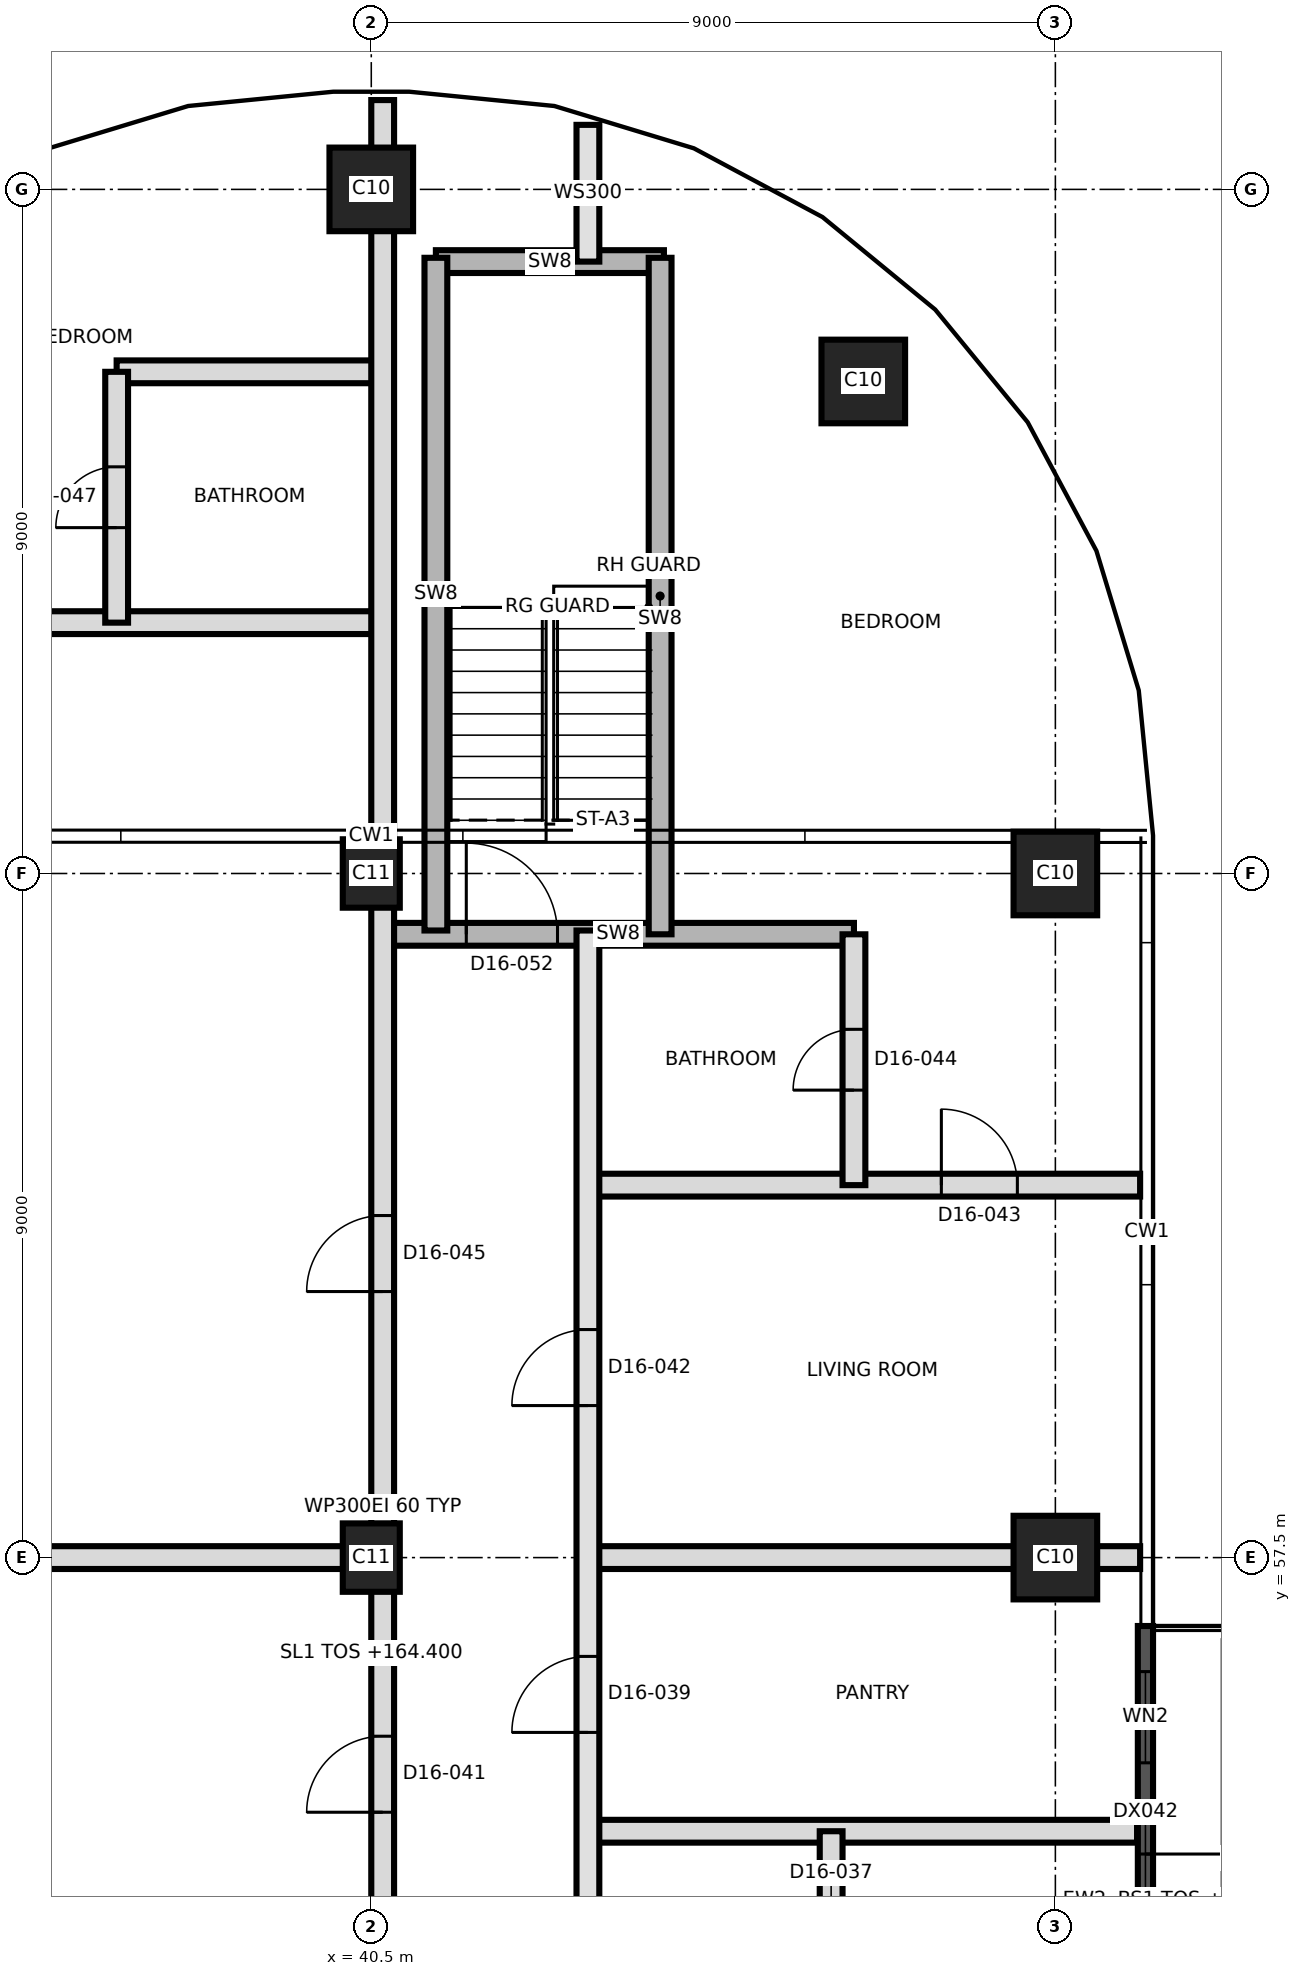
"""IFC4 building model, lengths in metres.
Left out: names, types, materials, properties, quantities, classifications, styles, units other than length and angle.
Written with IfcOpenShell. Run it as: python <this file> out.ifc"""

import sys

from ifc_helpers import new_model, si_unit, direction, frame, frame_2d, origin, origin_2d, place, context, subcontext, project, spatial, rectangle, extrude, element, fill, save


model = new_model("IFC4")
c1 = context("Model", 3, precision=1e-05, world=origin(), true_north=direction((0.0, 1.0)))
c2 = subcontext(c1, "Body", "Model", "MODEL_VIEW")
j1 = project(units=[si_unit("LENGTHUNIT", "METRE"), si_unit("PLANEANGLEUNIT", "RADIAN")], contexts=[c1])
p1 = place(None, origin())
s1 = spatial("IfcSite", under=j1, at=p1, CompositionType="ELEMENT")
p2 = place(p1, origin())
s2 = spatial("IfcBuilding", under=s1, at=p2, CompositionType="ELEMENT")
p3 = place(p2, frame((0.0, 0.0, 164.4)))
s3 = spatial("IfcBuildingStorey", under=s2, at=p3, CompositionType="ELEMENT", Elevation=164.4)
p4 = place(p3, frame((40.5, 57.5, 0.0), z_axis=(0.0, 0.0, 1.0), x_axis=(0.0, 1.0, 0.0)))
e1 = element("IfcColumn", 1, at=p4, inside=s3, PredefinedType="COLUMN", context=c2, shape_type="SweptSolid", body=[
    extrude(rectangle(XDim=0.9, YDim=0.75, at=origin_2d()), origin(), (0.0, 0.0, 1.0), 3.7),
])
p5 = place(p3, frame((49.5, 57.5, 0.0), z_axis=(0.0, 0.0, 1.0), x_axis=(1.0, 0.0, 0.0)))
e2 = element("IfcColumn", 2, at=p5, inside=s3, PredefinedType="COLUMN", context=c2, shape_type="SweptSolid", body=[
    extrude(rectangle(XDim=1.1, YDim=1.1, at=origin_2d()), origin(), (0.0, 0.0, 1.0), 3.7),
])
p6 = place(p3, frame((40.5, 66.5, 0.0), z_axis=(0.0, 0.0, 1.0), x_axis=(0.0, 1.0, 0.0)))
e3 = element("IfcColumn", 3, at=p6, inside=s3, PredefinedType="COLUMN", context=c2, shape_type="SweptSolid", body=[
    extrude(rectangle(XDim=0.9, YDim=0.75, at=origin_2d()), origin(), (0.0, 0.0, 1.0), 3.7),
])
for number, where, z_axis, x_axis in (
    (4, (49.5, 66.5, 0.0), (0.0, 0.0, 1.0), (1.0, 0.0, 0.0)),
    (5, (46.973, 72.973, 0.0), (0.0, 0.0, 1.0), (1.0, 0.0, 0.0)),
    (6, (40.5, 75.5, 0.0), (0.0, 0.0, 1.0), (1.0, 0.0, 0.0)),
):
    element("IfcColumn", number, at=place(p3, frame(where, z_axis=z_axis, x_axis=x_axis)), inside=s3, PredefinedType="COLUMN", context=c2, shape_type="SweptSolid", body=[
        extrude(rectangle(XDim=1.1, YDim=1.1, at=origin_2d()), origin(), (0.0, 0.0, 1.0), 3.7),
    ])
p7 = place(p3, frame((50.685, 56.6, 0.0), z_axis=(0.0, 0.0, 1.0), x_axis=(0.0, -1.0, 0.0)))
e7 = element("IfcWall", 7, at=p7, inside=s3, PredefinedType="SOLIDWALL", context=c2, shape_type="SweptSolid", body=[
    extrude(rectangle(XDim=7.2, YDim=0.2, at=frame_2d((3.6, 0.0))), origin(), (0.0, 0.0, 1.0), 3.4),
])
p8 = place(p7, frame((3.0, 0.0, 0.0)))
e8 = element("IfcOpeningElement", 8, at=p8, cuts=e7, PredefinedType="OPENING", context=c2, shape_type="SweptSolid", body=[
    extrude(rectangle(XDim=1.8, YDim=2.4, at=frame_2d((0.9, 1.2))), frame((0.0, 0.11, 0.0), z_axis=(0.0, -1.0, 0.0), x_axis=(1.0, 0.0, 0.0)), (0.0, 0.0, 1.0), 0.22),
])
p9 = place(p7, frame((5.4, 0.0, 0.9)))
e9 = element("IfcOpeningElement", 9, at=p9, cuts=e7, PredefinedType="OPENING", context=c2, shape_type="SweptSolid", body=[
    extrude(rectangle(XDim=1.2, YDim=2.1, at=frame_2d((0.6, 1.05))), frame((0.0, 0.11, 0.0), z_axis=(0.0, -1.0, 0.0), x_axis=(1.0, 0.0, 0.0)), (0.0, 0.0, 1.0), 0.22),
])
p10 = place(p7, frame((0.6, 0.0, 0.9)))
e10 = element("IfcOpeningElement", 10, at=p10, cuts=e7, PredefinedType="OPENING", context=c2, shape_type="SweptSolid", body=[
    extrude(rectangle(XDim=1.2, YDim=2.1, at=frame_2d((0.6, 1.05))), frame((0.0, 0.11, 0.0), z_axis=(0.0, -1.0, 0.0), x_axis=(1.0, 0.0, 0.0)), (0.0, 0.0, 1.0), 0.22),
])
p11 = place(p3, frame((43.35, 53.9, 0.0), z_axis=(0.0, 0.0, 1.0), x_axis=(1.0, 0.0, 0.0)))
e11 = element("IfcWall", 11, at=p11, inside=s3, PredefinedType="PARTITIONING", context=c2, shape_type="SweptSolid", body=[
    extrude(rectangle(XDim=7.225, YDim=0.3, at=frame_2d((3.612, 0.0))), origin(), (0.0, 0.0, 1.0), 3.4),
])
p12 = place(p3, frame((30.565, 57.5, 0.0), z_axis=(0.0, 0.0, 1.0), x_axis=(1.0, 0.0, 0.0)))
e12 = element("IfcWall", 12, at=p12, inside=s3, PredefinedType="PARTITIONING", context=c2, shape_type="SweptSolid", body=[
    extrude(rectangle(XDim=10.085, YDim=0.3, at=frame_2d((5.042, 0.0))), origin(), (0.0, 0.0, 1.0), 3.4),
])
p13 = place(p3, frame((43.35, 57.5, 0.0), z_axis=(0.0, 0.0, 1.0), x_axis=(1.0, 0.0, 0.0)))
e13 = element("IfcWall", 13, at=p13, inside=s3, PredefinedType="PARTITIONING", context=c2, shape_type="SweptSolid", body=[
    extrude(rectangle(XDim=7.265, YDim=0.3, at=frame_2d((3.632, 0.0))), origin(), (0.0, 0.0, 1.0), 3.4),
])
p14 = place(p3, frame((43.35, 62.4, 0.0), z_axis=(0.0, 0.0, 1.0), x_axis=(1.0, 0.0, 0.0)))
e14 = element("IfcWall", 14, at=p14, inside=s3, PredefinedType="PARTITIONING", context=c2, shape_type="SweptSolid", body=[
    extrude(rectangle(XDim=7.265, YDim=0.3, at=frame_2d((3.632, 0.0))), origin(), (0.0, 0.0, 1.0), 3.4),
])
p15 = place(p14, frame((4.65, 0.0, 0.0)))
e15 = element("IfcOpeningElement", 15, at=p15, cuts=e14, PredefinedType="OPENING", context=c2, shape_type="SweptSolid", body=[
    extrude(rectangle(XDim=1.0, YDim=2.1, at=frame_2d((0.5, 1.05))), frame((0.0, 0.16, 0.0), z_axis=(0.0, -1.0, 0.0), x_axis=(1.0, 0.0, 0.0)), (0.0, 0.0, 1.0), 0.32),
])
p16 = place(p3, frame((40.65, 65.7, 0.0), z_axis=(0.0, 0.0, 1.0), x_axis=(1.0, 0.0, 0.0)))
e16 = element("IfcWall", 16, at=p16, inside=s3, PredefinedType="SHEAR", context=c2, shape_type="SweptSolid", body=[
    extrude(rectangle(XDim=6.2, YDim=0.3, at=frame_2d((3.1, 0.0))), origin(), (0.0, 0.0, 1.0), 3.4),
])
p17 = place(p16, frame((1.1, 0.0, 0.0)))
e17 = element("IfcOpeningElement", 17, at=p17, cuts=e16, PredefinedType="OPENING", context=c2, shape_type="SweptSolid", body=[
    extrude(rectangle(XDim=1.2, YDim=2.1, at=frame_2d((0.6, 1.05))), frame((0.0, 0.16, 0.0), z_axis=(0.0, -1.0, 0.0), x_axis=(1.0, 0.0, 0.0)), (0.0, 0.0, 1.0), 0.32),
])
p18 = place(p3, frame((30.788, 69.8, 0.0), z_axis=(0.0, 0.0, 1.0), x_axis=(1.0, 0.0, 0.0)))
e18 = element("IfcWall", 18, at=p18, inside=s3, PredefinedType="PARTITIONING", context=c2, shape_type="SweptSolid", body=[
    extrude(rectangle(XDim=9.862, YDim=0.3, at=frame_2d((4.931, 0.0))), origin(), (0.0, 0.0, 1.0), 3.4),
])
p19 = place(p18, frame((4.212, 0.0, 0.0)))
e19 = element("IfcOpeningElement", 19, at=p19, cuts=e18, PredefinedType="OPENING", context=c2, shape_type="SweptSolid", body=[
    extrude(rectangle(XDim=1.0, YDim=2.1, at=frame_2d((0.5, 1.05))), frame((0.0, 0.16, 0.0), z_axis=(0.0, -1.0, 0.0), x_axis=(1.0, 0.0, 0.0)), (0.0, 0.0, 1.0), 0.32),
])
p20 = place(p3, frame((37.15, 73.1, 0.0), z_axis=(0.0, 0.0, 1.0), x_axis=(1.0, 0.0, 0.0)))
e20 = element("IfcWall", 20, at=p20, inside=s3, PredefinedType="PARTITIONING", context=c2, shape_type="SweptSolid", body=[
    extrude(rectangle(XDim=3.5, YDim=0.3, at=frame_2d((1.75, 0.0))), origin(), (0.0, 0.0, 1.0), 3.4),
])
p21 = place(p3, frame((41.35, 74.55, 0.0), z_axis=(0.0, 0.0, 1.0), x_axis=(1.0, 0.0, 0.0)))
e21 = element("IfcWall", 21, at=p21, inside=s3, PredefinedType="SHEAR", context=c2, shape_type="SweptSolid", body=[
    extrude(rectangle(XDim=3.0, YDim=0.3, at=frame_2d((1.5, 0.0))), origin(), (0.0, 0.0, 1.0), 3.4),
])
p22 = place(p3, frame((37.15, 69.8, 0.0), z_axis=(0.0, 0.0, 1.0), x_axis=(0.0, 1.0, 0.0)))
e22 = element("IfcWall", 22, at=p22, inside=s3, PredefinedType="PARTITIONING", context=c2, shape_type="SweptSolid", body=[
    extrude(rectangle(XDim=3.3, YDim=0.3, at=frame_2d((1.65, 0.0))), origin(), (0.0, 0.0, 1.0), 3.4),
])
p23 = place(p22, frame((1.25, 0.0, 0.0)))
e23 = element("IfcOpeningElement", 23, at=p23, cuts=e22, PredefinedType="OPENING", context=c2, shape_type="SweptSolid", body=[
    extrude(rectangle(XDim=0.8, YDim=2.1, at=frame_2d((0.4, 1.05))), frame((0.0, 0.16, 0.0), z_axis=(0.0, -1.0, 0.0), x_axis=(1.0, 0.0, 0.0)), (0.0, 0.0, 1.0), 0.32),
])
p24 = place(p3, frame((40.65, 39.65, 0.0), z_axis=(0.0, 0.0, 1.0), x_axis=(0.0, 1.0, 0.0)))
e24 = element("IfcWall", 24, at=p24, inside=s3, PredefinedType="PARTITIONING", context=c2, shape_type="SweptSolid", body=[
    extrude(rectangle(XDim=37.025, YDim=0.3, at=frame_2d((18.513, 0.0))), origin(), (0.0, 0.0, 1.0), 3.4),
])
p25 = place(p24, frame((1.0, 0.0, 0.0)))
e25 = element("IfcOpeningElement", 25, at=p25, cuts=e24, PredefinedType="OPENING", context=c2, shape_type="SweptSolid", body=[
    extrude(rectangle(XDim=1.0, YDim=2.1, at=frame_2d((0.5, 1.05))), frame((0.0, 0.16, 0.0), z_axis=(0.0, -1.0, 0.0), x_axis=(1.0, 0.0, 0.0)), (0.0, 0.0, 1.0), 0.32),
])
p26 = place(p24, frame((6.85, 0.0, 0.0)))
e26 = element("IfcOpeningElement", 26, at=p26, cuts=e24, PredefinedType="OPENING", context=c2, shape_type="SweptSolid", body=[
    extrude(rectangle(XDim=1.0, YDim=2.1, at=frame_2d((0.5, 1.05))), frame((0.0, 0.16, 0.0), z_axis=(0.0, -1.0, 0.0), x_axis=(1.0, 0.0, 0.0)), (0.0, 0.0, 1.0), 0.32),
])
p27 = place(p24, frame((14.5, 0.0, 0.0)))
e27 = element("IfcOpeningElement", 27, at=p27, cuts=e24, PredefinedType="OPENING", context=c2, shape_type="SweptSolid", body=[
    extrude(rectangle(XDim=1.0, YDim=2.4, at=frame_2d((0.5, 1.2))), frame((0.0, 0.16, 0.0), z_axis=(0.0, -1.0, 0.0), x_axis=(1.0, 0.0, 0.0)), (0.0, 0.0, 1.0), 0.32),
])
p28 = place(p24, frame((21.35, 0.0, 0.0)))
e28 = element("IfcOpeningElement", 28, at=p28, cuts=e24, PredefinedType="OPENING", context=c2, shape_type="SweptSolid", body=[
    extrude(rectangle(XDim=1.0, YDim=2.4, at=frame_2d((0.5, 1.2))), frame((0.0, 0.16, 0.0), z_axis=(0.0, -1.0, 0.0), x_axis=(1.0, 0.0, 0.0)), (0.0, 0.0, 1.0), 0.32),
])
p29 = place(p3, frame((41.35, 65.75, 0.0), z_axis=(0.0, 0.0, 1.0), x_axis=(0.0, 1.0, 0.0)))
e29 = element("IfcWall", 29, at=p29, inside=s3, PredefinedType="SHEAR", context=c2, shape_type="SweptSolid", body=[
    extrude(rectangle(XDim=8.85, YDim=0.3, at=frame_2d((4.425, 0.0))), origin(), (0.0, 0.0, 1.0), 3.4),
])
p30 = place(p3, frame((43.35, 39.65, 0.0), z_axis=(0.0, 0.0, 1.0), x_axis=(0.0, 1.0, 0.0)))
e30 = element("IfcWall", 30, at=p30, inside=s3, PredefinedType="SOLIDWALL", context=c2, shape_type="SweptSolid", body=[
    extrude(rectangle(XDim=26.1, YDim=0.3, at=frame_2d((13.05, 0.0))), origin(), (0.0, 0.0, 1.0), 3.4),
])
p31 = place(p30, frame((0.985, 0.0, 0.0)))
e31 = element("IfcOpeningElement", 31, at=p31, cuts=e30, PredefinedType="OPENING", context=c2, shape_type="SweptSolid", body=[
    extrude(rectangle(XDim=1.2, YDim=2.1, at=frame_2d((0.6, 1.05))), frame((0.0, 0.16, 0.0), z_axis=(0.0, -1.0, 0.0), x_axis=(1.0, 0.0, 0.0)), (0.0, 0.0, 1.0), 0.32),
])
p32 = place(p30, frame((4.235, 0.0, 0.0)))
e32 = element("IfcOpeningElement", 32, at=p32, cuts=e30, PredefinedType="OPENING", context=c2, shape_type="SweptSolid", body=[
    extrude(rectangle(XDim=1.0, YDim=2.1, at=frame_2d((0.5, 1.05))), frame((0.0, 0.16, 0.0), z_axis=(0.0, -1.0, 0.0), x_axis=(1.0, 0.0, 0.0)), (0.0, 0.0, 1.0), 0.32),
])
p33 = place(p30, frame((9.7, 0.0, 0.0)))
e33 = element("IfcOpeningElement", 33, at=p33, cuts=e30, PredefinedType="OPENING", context=c2, shape_type="SweptSolid", body=[
    extrude(rectangle(XDim=1.0, YDim=2.1, at=frame_2d((0.5, 1.05))), frame((0.0, 0.16, 0.0), z_axis=(0.0, -1.0, 0.0), x_axis=(1.0, 0.0, 0.0)), (0.0, 0.0, 1.0), 0.32),
])
p34 = place(p30, frame((15.55, 0.0, 0.0)))
e34 = element("IfcOpeningElement", 34, at=p34, cuts=e30, PredefinedType="OPENING", context=c2, shape_type="SweptSolid", body=[
    extrude(rectangle(XDim=1.0, YDim=2.1, at=frame_2d((0.5, 1.05))), frame((0.0, 0.16, 0.0), z_axis=(0.0, -1.0, 0.0), x_axis=(1.0, 0.0, 0.0)), (0.0, 0.0, 1.0), 0.32),
])
p35 = place(p30, frame((19.85, 0.0, 0.0)))
e35 = element("IfcOpeningElement", 35, at=p35, cuts=e30, PredefinedType="OPENING", context=c2, shape_type="SweptSolid", body=[
    extrude(rectangle(XDim=1.0, YDim=2.4, at=frame_2d((0.5, 1.2))), frame((0.0, 0.16, 0.0), z_axis=(0.0, -1.0, 0.0), x_axis=(1.0, 0.0, 0.0)), (0.0, 0.0, 1.0), 0.32),
])
p36 = place(p3, frame((43.35, 74.55, 0.0), z_axis=(0.0, 0.0, 1.0), x_axis=(0.0, 1.0, 0.0)))
e36 = element("IfcWall", 36, at=p36, inside=s3, PredefinedType="SOLIDWALL", context=c2, shape_type="SweptSolid", body=[
    extrude(rectangle(XDim=1.799, YDim=0.3, at=frame_2d((0.899, 0.0))), origin(), (0.0, 0.0, 1.0), 3.4),
])
p37 = place(p3, frame((44.3, 65.7, 0.0), z_axis=(0.0, 0.0, 1.0), x_axis=(0.0, 1.0, 0.0)))
e37 = element("IfcWall", 37, at=p37, inside=s3, PredefinedType="SHEAR", context=c2, shape_type="SweptSolid", body=[
    extrude(rectangle(XDim=8.9, YDim=0.3, at=frame_2d((4.45, 0.0))), origin(), (0.0, 0.0, 1.0), 3.4),
])
p38 = place(p3, frame((46.55, 51.2, 0.0), z_axis=(0.0, 0.0, 1.0), x_axis=(0.0, 1.0, 0.0)))
e38 = element("IfcWall", 38, at=p38, inside=s3, PredefinedType="PARTITIONING", context=c2, shape_type="SweptSolid", body=[
    extrude(rectangle(XDim=2.7, YDim=0.3, at=frame_2d((1.35, 0.0))), origin(), (0.0, 0.0, 1.0), 3.4),
])
p39 = place(p38, frame((0.95, 0.0, 0.0)))
e39 = element("IfcOpeningElement", 39, at=p39, cuts=e38, PredefinedType="OPENING", context=c2, shape_type="SweptSolid", body=[
    extrude(rectangle(XDim=0.8, YDim=2.1, at=frame_2d((0.4, 1.05))), frame((0.0, 0.16, 0.0), z_axis=(0.0, -1.0, 0.0), x_axis=(1.0, 0.0, 0.0)), (0.0, 0.0, 1.0), 0.32),
])
p40 = place(p3, frame((46.85, 62.4, 0.0), z_axis=(0.0, 0.0, 1.0), x_axis=(0.0, 1.0, 0.0)))
e40 = element("IfcWall", 40, at=p40, inside=s3, PredefinedType="PARTITIONING", context=c2, shape_type="SweptSolid", body=[
    extrude(rectangle(XDim=3.3, YDim=0.3, at=frame_2d((1.65, 0.0))), origin(), (0.0, 0.0, 1.0), 3.4),
])
p41 = place(p40, frame((1.25, 0.0, 0.0)))
e41 = element("IfcOpeningElement", 41, at=p41, cuts=e40, PredefinedType="OPENING", context=c2, shape_type="SweptSolid", body=[
    extrude(rectangle(XDim=0.8, YDim=2.1, at=frame_2d((0.4, 1.05))), frame((0.0, 0.16, 0.0), z_axis=(0.0, -1.0, 0.0), x_axis=(1.0, 0.0, 0.0)), (0.0, 0.0, 1.0), 0.32),
])
p42 = place(p8, origin())
e42 = element("IfcDoor", 42, at=p42, inside=s3, OperationType="SINGLE_SWING_LEFT", PredefinedType="DOOR", context=c2, shape_type="SweptSolid", body=[
    extrude(rectangle(XDim=1.8, YDim=2.4, at=frame_2d((0.9, 1.2))), frame((0.0, 0.025, 0.0), z_axis=(0.0, -1.0, 0.0), x_axis=(1.0, 0.0, 0.0)), (0.0, 0.0, 1.0), 0.05),
])
fill(e8, e42)
p43 = place(p10, origin())
e43 = element("IfcWindow", 43, at=p43, inside=s3, PartitioningType="SINGLE_PANEL", PredefinedType="WINDOW", context=c2, shape_type="SweptSolid", body=[
    extrude(rectangle(XDim=1.2, YDim=2.1, at=frame_2d((0.6, 1.05))), frame((0.0, 0.03, 0.0), z_axis=(0.0, -1.0, 0.0), x_axis=(1.0, 0.0, 0.0)), (0.0, 0.0, 1.0), 0.06),
])
fill(e10, e43)
p44 = place(p34, origin())
e44 = element("IfcDoor", 44, at=p44, inside=s3, OperationType="SINGLE_SWING_LEFT", PredefinedType="DOOR", context=c2, shape_type="SweptSolid", body=[
    extrude(rectangle(XDim=1.0, YDim=2.1, at=frame_2d((0.5, 1.05))), frame((0.0, 0.025, 0.0), z_axis=(0.0, -1.0, 0.0), x_axis=(1.0, 0.0, 0.0)), (0.0, 0.0, 1.0), 0.05),
])
fill(e34, e44)
p45 = place(p27, origin())
e45 = element("IfcDoor", 45, at=p45, inside=s3, OperationType="SINGLE_SWING_RIGHT", PredefinedType="DOOR", context=c2, shape_type="SweptSolid", body=[
    extrude(rectangle(XDim=1.0, YDim=2.4, at=frame_2d((0.5, 1.2))), frame((0.0, 0.025, 0.0), z_axis=(0.0, -1.0, 0.0), x_axis=(1.0, 0.0, 0.0)), (0.0, 0.0, 1.0), 0.05),
])
fill(e27, e45)
p46 = place(p35, origin())
e46 = element("IfcDoor", 46, at=p46, inside=s3, OperationType="SINGLE_SWING_LEFT", PredefinedType="DOOR", context=c2, shape_type="SweptSolid", body=[
    extrude(rectangle(XDim=1.0, YDim=2.4, at=frame_2d((0.5, 1.2))), frame((0.0, 0.025, 0.0), z_axis=(0.0, -1.0, 0.0), x_axis=(1.0, 0.0, 0.0)), (0.0, 0.0, 1.0), 0.05),
])
fill(e35, e46)
p47 = place(p15, origin())
e47 = element("IfcDoor", 47, at=p47, inside=s3, OperationType="SINGLE_SWING_RIGHT", PredefinedType="DOOR", context=c2, shape_type="SweptSolid", body=[
    extrude(rectangle(XDim=1.0, YDim=2.1, at=frame_2d((0.5, 1.05))), frame((0.0, 0.025, 0.0), z_axis=(0.0, -1.0, 0.0), x_axis=(1.0, 0.0, 0.0)), (0.0, 0.0, 1.0), 0.05),
])
fill(e15, e47)
p48 = place(p41, origin())
e48 = element("IfcDoor", 48, at=p48, inside=s3, OperationType="SINGLE_SWING_LEFT", PredefinedType="DOOR", context=c2, shape_type="SweptSolid", body=[
    extrude(rectangle(XDim=0.8, YDim=2.1, at=frame_2d((0.4, 1.05))), frame((0.0, 0.025, 0.0), z_axis=(0.0, -1.0, 0.0), x_axis=(1.0, 0.0, 0.0)), (0.0, 0.0, 1.0), 0.05),
])
fill(e41, e48)
p49 = place(p28, origin())
e49 = element("IfcDoor", 49, at=p49, inside=s3, OperationType="SINGLE_SWING_LEFT", PredefinedType="DOOR", context=c2, shape_type="SweptSolid", body=[
    extrude(rectangle(XDim=1.0, YDim=2.4, at=frame_2d((0.5, 1.2))), frame((0.0, 0.025, 0.0), z_axis=(0.0, -1.0, 0.0), x_axis=(1.0, 0.0, 0.0)), (0.0, 0.0, 1.0), 0.05),
])
fill(e28, e49)
p50 = place(p23, origin())
e50 = element("IfcDoor", 50, at=p50, inside=s3, OperationType="SINGLE_SWING_LEFT", PredefinedType="DOOR", context=c2, shape_type="SweptSolid", body=[
    extrude(rectangle(XDim=0.8, YDim=2.1, at=frame_2d((0.4, 1.05))), frame((0.0, 0.025, 0.0), z_axis=(0.0, -1.0, 0.0), x_axis=(1.0, 0.0, 0.0)), (0.0, 0.0, 1.0), 0.05),
])
fill(e23, e50)
p51 = place(p17, origin())
e51 = element("IfcDoor", 51, at=p51, inside=s3, OperationType="SINGLE_SWING_RIGHT", PredefinedType="DOOR", context=c2, shape_type="SweptSolid", body=[
    extrude(rectangle(XDim=1.2, YDim=2.1, at=frame_2d((0.6, 1.05))), frame((0.0, 0.025, 0.0), z_axis=(0.0, -1.0, 0.0), x_axis=(1.0, 0.0, 0.0)), (0.0, 0.0, 1.0), 0.05),
])
fill(e17, e51)
save(model, sys.argv[1])
